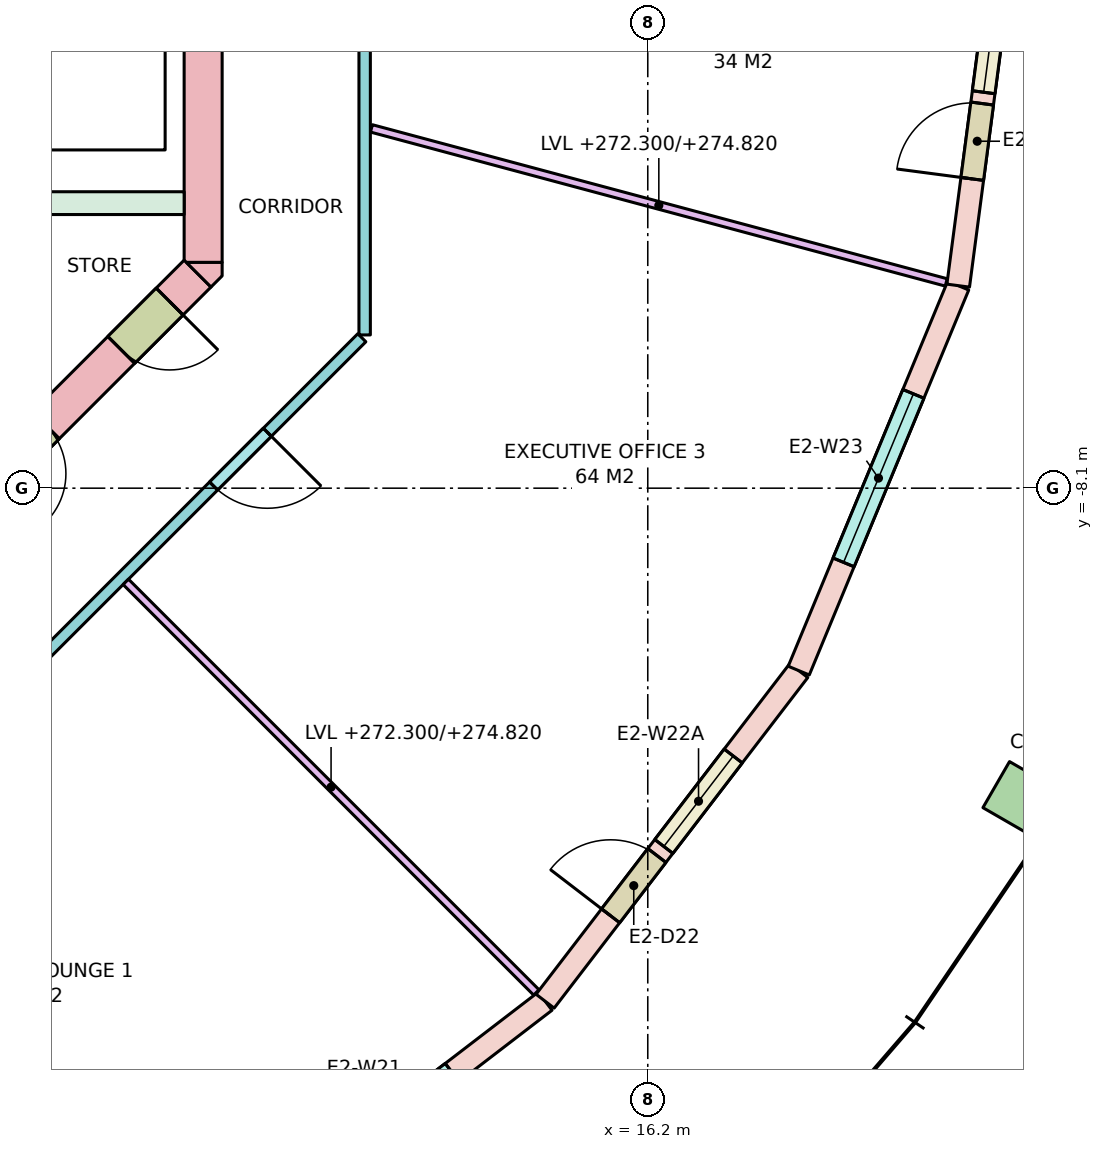
"""IFC4 building model, lengths in metres.
Left out: names, types, materials, properties, quantities, classifications, styles, units other than length and angle.
Written with IfcOpenShell. Run it as: python <this file> out.ifc"""

import sys

from ifc_helpers import new_model, si_unit, direction, frame, frame_2d, origin, origin_2d, place, context, subcontext, project, spatial, polyline, rectangle, outline, extrude, element, fill, save


model = new_model("IFC4")
c1 = context("Model", 3, precision=1e-05, world=origin(), true_north=direction((0.0, 1.0)))
c2 = subcontext(c1, "Body", "Model", "MODEL_VIEW")
j1 = project(units=[si_unit("LENGTHUNIT", "METRE"), si_unit("PLANEANGLEUNIT", "RADIAN")], contexts=[c1])
p1 = place(None, origin())
s1 = spatial("IfcSite", under=j1, at=p1, CompositionType="ELEMENT")
p2 = place(p1, origin())
s2 = spatial("IfcBuilding", under=s1, at=p2, CompositionType="ELEMENT")
p3 = place(p2, frame((0.0, 0.0, 272.3)))
s3 = spatial("IfcBuildingStorey", under=s2, at=p3, CompositionType="ELEMENT", Elevation=272.3)
p4 = place(p3, frame((21.218, -12.25, 0.0), z_axis=(0.0, 0.0, 1.0), x_axis=(0.5, 0.866025403784, 0.0)))
e1 = element("IfcColumn", 1, at=p4, inside=s3, PredefinedType="COLUMN", context=c2, shape_type="SweptSolid", body=[
    extrude(rectangle(XDim=0.7, YDim=1.0, at=origin_2d()), origin(), (0.0, 0.0, 1.0), 3.7),
])
p5 = place(p3, frame((10.35, -5.13, -0.28), z_axis=(0.0, 0.0, 1.0), x_axis=(0.0, 1.0, 0.0)))
e2 = element("IfcWall", 2, at=p5, inside=s3, PredefinedType="SHEAR", context=c2, shape_type="SweptSolid", body=[
    extrude(rectangle(XDim=10.26, YDim=0.5, at=frame_2d((5.13, 0.0))), origin(), (0.0, 0.0, 1.0), 3.7),
])
p6 = place(p5, frame((4.13, 0.0, 0.28)))
e3 = element("IfcOpeningElement", 3, at=p6, cuts=e2, PredefinedType="OPENING", context=c2, shape_type="SweptSolid", body=[
    extrude(rectangle(XDim=2.0, YDim=2.1, at=frame_2d((1.0, 1.05))), frame((0.0, 0.26, 0.0), z_axis=(0.0, -1.0, 0.0), x_axis=(1.0, 0.0, 0.0)), (0.0, 0.0, 1.0), 0.52),
])
p7 = place(p3, frame((10.277, -5.277, -0.28), z_axis=(0.0, 0.0, 1.0), x_axis=(-0.707106781187, -0.707106781187, 0.0)))
e4 = element("IfcWall", 4, at=p7, inside=s3, PredefinedType="SHEAR", context=c2, shape_type="SweptSolid", body=[
    extrude(rectangle(XDim=4.243, YDim=0.5, at=frame_2d((2.121, 0.0))), origin(), (0.0, 0.0, 1.0), 3.7),
])
p8 = place(p7, frame((2.823, 0.0, 0.28)))
e5 = element("IfcOpeningElement", 5, at=p8, cuts=e4, PredefinedType="OPENING", context=c2, shape_type="SweptSolid", body=[
    extrude(rectangle(XDim=0.9, YDim=2.1, at=frame_2d((0.45, 1.05))), frame((0.0, 0.26, 0.0), z_axis=(0.0, -1.0, 0.0), x_axis=(1.0, 0.0, 0.0)), (0.0, 0.0, 1.0), 0.52),
])
p9 = place(p7, frame((0.52, 0.0, 0.28)))
e6 = element("IfcOpeningElement", 6, at=p9, cuts=e4, PredefinedType="OPENING", context=c2, shape_type="SweptSolid", body=[
    extrude(rectangle(XDim=0.9, YDim=2.1, at=frame_2d((0.45, 1.05))), frame((0.0, 0.26, 0.0), z_axis=(0.0, -1.0, 0.0), x_axis=(1.0, 0.0, 0.0)), (0.0, 0.0, 1.0), 0.52),
])
p10 = place(p3, frame((0.0, 0.0, -0.28)))
e7 = element("IfcWall", 7, at=p10, inside=s3, PredefinedType="SHEAR", context=c2, shape_type="SweptSolid", body=[
    extrude(outline(polyline([(10.6, -5.307), (10.454, -5.454), (10.13, -5.13), (10.6, -5.13), (10.6, -5.307)])), origin(), (0.0, 0.0, 1.0), 3.7),
])
p11 = place(p3, frame((2.0, -4.35, 0.0), z_axis=(0.0, 0.0, 1.0), x_axis=(1.0, 0.0, 0.0)))
e8 = element("IfcWall", 8, at=p11, inside=s3, PredefinedType="SOLIDWALL", context=c2, shape_type="SweptSolid", body=[
    extrude(rectangle(XDim=8.1, YDim=0.3, at=frame_2d((4.05, 0.0))), origin(), (0.0, 0.0, 1.0), 3.42),
])
p12 = place(p3, frame((10.5, -18.187, 0.0), z_axis=(0.0, 0.0, 1.0), x_axis=(0.793335336593, 0.608784891166, 0.0)))
e9 = element("IfcWall", 9, at=p12, inside=s3, PredefinedType="STANDARD", context=c2, shape_type="SweptSolid", body=[
    extrude(rectangle(XDim=5.482, YDim=0.3, at=frame_2d((2.741, 0.0))), origin(), (0.0, 0.0, 1.0), 3.42),
])
p13 = place(p12, frame((1.541, 0.0, 0.8)))
e10 = element("IfcOpeningElement", 10, at=p13, cuts=e9, PredefinedType="OPENING", context=c2, shape_type="SweptSolid", body=[
    extrude(rectangle(XDim=2.4, YDim=2.4, at=frame_2d((1.2, 1.2))), frame((0.0, 0.16, 0.0), z_axis=(0.0, -1.0, 0.0), x_axis=(1.0, 0.0, 0.0)), (0.0, 0.0, 1.0), 0.32),
])
p14 = place(p3, frame((14.849, -14.849, 0.0), z_axis=(0.0, 0.0, 1.0), x_axis=(0.608784891166, 0.793335336593, 0.0)))
e11 = element("IfcWall", 11, at=p14, inside=s3, PredefinedType="STANDARD", context=c2, shape_type="SweptSolid", body=[
    extrude(rectangle(XDim=5.482, YDim=0.3, at=frame_2d((2.741, 0.0))), origin(), (0.0, 0.0, 1.0), 3.42),
])
p15 = place(p14, frame((1.416, 0.0, 0.0)))
e12 = element("IfcOpeningElement", 12, at=p15, cuts=e11, PredefinedType="OPENING", context=c2, shape_type="SweptSolid", body=[
    extrude(rectangle(XDim=1.0, YDim=2.4, at=frame_2d((0.5, 1.2))), frame((0.0, 0.16, 0.0), z_axis=(0.0, -1.0, 0.0), x_axis=(1.0, 0.0, 0.0)), (0.0, 0.0, 1.0), 0.32),
])
p16 = place(p14, frame((2.566, 0.0, 0.8)))
e13 = element("IfcOpeningElement", 13, at=p16, cuts=e11, PredefinedType="OPENING", context=c2, shape_type="SweptSolid", body=[
    extrude(rectangle(XDim=1.5, YDim=2.4, at=frame_2d((0.75, 1.2))), frame((0.0, 0.16, 0.0), z_axis=(0.0, -1.0, 0.0), x_axis=(1.0, 0.0, 0.0)), (0.0, 0.0, 1.0), 0.32),
])
p17 = place(p3, frame((18.187, -10.5, 0.0), z_axis=(0.0, 0.0, 1.0), x_axis=(0.382688740813, 0.923877333662, 0.0)))
e14 = element("IfcWall", 14, at=p17, inside=s3, PredefinedType="STANDARD", context=c2, shape_type="SweptSolid", body=[
    extrude(rectangle(XDim=5.482, YDim=0.3, at=frame_2d((2.741, 0.0))), origin(), (0.0, 0.0, 1.0), 3.42),
])
p18 = place(p17, frame((1.541, 0.0, 0.8)))
e15 = element("IfcOpeningElement", 15, at=p18, cuts=e14, PredefinedType="OPENING", context=c2, shape_type="SweptSolid", body=[
    extrude(rectangle(XDim=2.4, YDim=2.4, at=frame_2d((1.2, 1.2))), frame((0.0, 0.16, 0.0), z_axis=(0.0, -1.0, 0.0), x_axis=(1.0, 0.0, 0.0)), (0.0, 0.0, 1.0), 0.32),
])
p19 = place(p3, frame((20.284, -5.435, 0.0), z_axis=(0.0, 0.0, 1.0), x_axis=(0.130527087244, 0.991444743541, 0.0)))
e16 = element("IfcWall", 16, at=p19, inside=s3, PredefinedType="STANDARD", context=c2, shape_type="SweptSolid", body=[
    extrude(rectangle(XDim=5.482, YDim=0.3, at=frame_2d((2.741, 0.0))), origin(), (0.0, 0.0, 1.0), 3.42),
])
p20 = place(p19, frame((1.416, 0.0, 0.0)))
e17 = element("IfcOpeningElement", 17, at=p20, cuts=e16, PredefinedType="OPENING", context=c2, shape_type="SweptSolid", body=[
    extrude(rectangle(XDim=1.0, YDim=2.4, at=frame_2d((0.5, 1.2))), frame((0.0, 0.16, 0.0), z_axis=(0.0, -1.0, 0.0), x_axis=(1.0, 0.0, 0.0)), (0.0, 0.0, 1.0), 0.32),
])
p21 = place(p19, frame((2.566, 0.0, 0.8)))
e18 = element("IfcOpeningElement", 18, at=p21, cuts=e16, PredefinedType="OPENING", context=c2, shape_type="SweptSolid", body=[
    extrude(rectangle(XDim=1.5, YDim=2.4, at=frame_2d((0.75, 1.2))), frame((0.0, 0.16, 0.0), z_axis=(0.0, -1.0, 0.0), x_axis=(1.0, 0.0, 0.0)), (0.0, 0.0, 1.0), 0.32),
])
p22 = place(p3, frame((12.438, -6.121, 0.0), z_axis=(0.0, 0.0, 1.0), x_axis=(-0.707106781187, -0.707106781187, 0.0)))
e19 = element("IfcWall", 19, at=p22, inside=s3, PredefinedType="PARTITIONING", context=c2, shape_type="SweptSolid", body=[
    extrude(rectangle(XDim=6.105, YDim=0.15, at=frame_2d((3.053, 0.0))), origin(), (0.0, 0.0, 1.0), 2.52),
])
p23 = place(p22, frame((1.758, 0.0, 0.0)))
e20 = element("IfcOpeningElement", 20, at=p23, cuts=e19, PredefinedType="OPENING", context=c2, shape_type="SweptSolid", body=[
    extrude(rectangle(XDim=1.0, YDim=2.1, at=frame_2d((0.5, 1.05))), frame((0.0, 0.085, 0.0), z_axis=(0.0, -1.0, 0.0), x_axis=(1.0, 0.0, 0.0)), (0.0, 0.0, 1.0), 0.17),
])
p24 = place(p3, frame((12.475, 6.084, 0.0), z_axis=(0.0, 0.0, 1.0), x_axis=(0.0, -1.0, 0.0)))
e21 = element("IfcWall", 21, at=p24, inside=s3, PredefinedType="PARTITIONING", context=c2, shape_type="SweptSolid", body=[
    extrude(rectangle(XDim=12.167, YDim=0.15, at=frame_2d((6.084, 0.0))), origin(), (0.0, 0.0, 1.0), 2.52),
])
p25 = place(p24, frame((7.306, 0.0, 0.0)))
e22 = element("IfcOpeningElement", 22, at=p25, cuts=e21, PredefinedType="OPENING", context=c2, shape_type="SweptSolid", body=[
    extrude(rectangle(XDim=0.9, YDim=2.1, at=frame_2d((0.45, 1.05))), frame((0.0, 0.085, 0.0), z_axis=(0.0, -1.0, 0.0), x_axis=(1.0, 0.0, 0.0)), (0.0, 0.0, 1.0), 0.17),
])
p26 = place(p24, frame((2.567, 0.0, 0.0)))
e23 = element("IfcOpeningElement", 23, at=p26, cuts=e21, PredefinedType="OPENING", context=c2, shape_type="SweptSolid", body=[
    extrude(rectangle(XDim=1.0, YDim=2.1, at=frame_2d((0.5, 1.05))), frame((0.0, 0.085, 0.0), z_axis=(0.0, -1.0, 0.0), x_axis=(1.0, 0.0, 0.0)), (0.0, 0.0, 1.0), 0.17),
])
p27 = place(p3, frame((9.333, -9.333, 0.0), z_axis=(0.0, 0.0, 1.0), x_axis=(0.707106781187, -0.707106781187, 0.0)))
e24 = element("IfcWall", 24, at=p27, inside=s3, PredefinedType="PARTITIONING", context=c2, shape_type="SweptSolid", body=[
    extrude(rectangle(XDim=7.639, YDim=0.1, at=frame_2d((3.819, 0.0))), origin(), (0.0, 0.0, 1.0), 2.52),
])
p28 = place(p3, frame((12.564, -3.367, 0.0), z_axis=(0.0, 0.0, 1.0), x_axis=(0.965933576344, -0.258790119773, 0.0)))
e25 = element("IfcWall", 25, at=p28, inside=s3, PredefinedType="PARTITIONING", context=c2, shape_type="SweptSolid", body=[
    extrude(rectangle(XDim=7.829, YDim=0.1, at=frame_2d((3.915, 0.0))), origin(), (0.0, 0.0, 1.0), 2.52),
])
p29 = place(p15, origin())
e26 = element("IfcDoor", 26, at=p29, inside=s3, OperationType="SINGLE_SWING_LEFT", PredefinedType="DOOR", context=c2, shape_type="SweptSolid", body=[
    extrude(rectangle(XDim=1.0, YDim=2.4, at=frame_2d((0.5, 1.2))), frame((0.0, 0.025, 0.0), z_axis=(0.0, -1.0, 0.0), x_axis=(1.0, 0.0, 0.0)), (0.0, 0.0, 1.0), 0.05),
])
fill(e12, e26)
p30 = place(p16, origin())
e27 = element("IfcWindow", 27, at=p30, inside=s3, PartitioningType="SINGLE_PANEL", PredefinedType="WINDOW", context=c2, shape_type="SweptSolid", body=[
    extrude(rectangle(XDim=1.5, YDim=2.4, at=frame_2d((0.75, 1.2))), frame((0.0, 0.03, 0.0), z_axis=(0.0, -1.0, 0.0), x_axis=(1.0, 0.0, 0.0)), (0.0, 0.0, 1.0), 0.06),
])
fill(e13, e27)
p31 = place(p18, origin())
e28 = element("IfcWindow", 28, at=p31, inside=s3, PartitioningType="SINGLE_PANEL", PredefinedType="WINDOW", context=c2, shape_type="SweptSolid", body=[
    extrude(rectangle(XDim=2.4, YDim=2.4, at=frame_2d((1.2, 1.2))), frame((0.0, 0.03, 0.0), z_axis=(0.0, -1.0, 0.0), x_axis=(1.0, 0.0, 0.0)), (0.0, 0.0, 1.0), 0.06),
])
fill(e15, e28)
p32 = place(p20, origin())
e29 = element("IfcDoor", 29, at=p32, inside=s3, OperationType="SINGLE_SWING_LEFT", PredefinedType="DOOR", context=c2, shape_type="SweptSolid", body=[
    extrude(rectangle(XDim=1.0, YDim=2.4, at=frame_2d((0.5, 1.2))), frame((0.0, 0.025, 0.0), z_axis=(0.0, -1.0, 0.0), x_axis=(1.0, 0.0, 0.0)), (0.0, 0.0, 1.0), 0.05),
])
fill(e17, e29)
p33 = place(p21, origin())
e30 = element("IfcWindow", 30, at=p33, inside=s3, PartitioningType="SINGLE_PANEL", PredefinedType="WINDOW", context=c2, shape_type="SweptSolid", body=[
    extrude(rectangle(XDim=1.5, YDim=2.4, at=frame_2d((0.75, 1.2))), frame((0.0, 0.03, 0.0), z_axis=(0.0, -1.0, 0.0), x_axis=(1.0, 0.0, 0.0)), (0.0, 0.0, 1.0), 0.06),
])
fill(e18, e30)
p34 = place(p9, origin())
e31 = element("IfcDoor", 31, at=p34, inside=s3, OperationType="SINGLE_SWING_LEFT", PredefinedType="DOOR", context=c2, shape_type="SweptSolid", body=[
    extrude(rectangle(XDim=0.9, YDim=2.1, at=frame_2d((0.45, 1.05))), frame((0.0, 0.025, 0.0), z_axis=(0.0, -1.0, 0.0), x_axis=(1.0, 0.0, 0.0)), (0.0, 0.0, 1.0), 0.05),
])
fill(e6, e31)
p35 = place(p23, origin())
e32 = element("IfcDoor", 32, at=p35, inside=s3, OperationType="SINGLE_SWING_LEFT", PredefinedType="DOOR", context=c2, shape_type="SweptSolid", body=[
    extrude(rectangle(XDim=1.0, YDim=2.1, at=frame_2d((0.5, 1.05))), frame((0.0, 0.025, 0.0), z_axis=(0.0, -1.0, 0.0), x_axis=(1.0, 0.0, 0.0)), (0.0, 0.0, 1.0), 0.05),
])
fill(e20, e32)
save(model, sys.argv[1])
